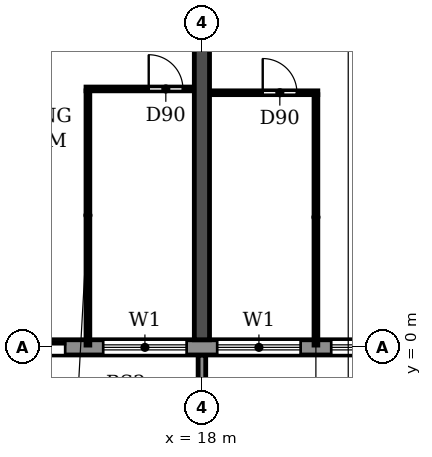
"""IFC4 building model, lengths in metres.
Left out: names, types, materials, properties, quantities, classifications, styles, units other than length and angle.
Written with IfcOpenShell. Run it as: python <this file> out.ifc"""

import sys

from ifc_helpers import new_model, si_unit, direction, frame, frame_2d, origin, place, context, subcontext, project, spatial, polyline, rectangle, outline, extrude, source, transform, mapped, element, fill, save


model = new_model("IFC4")
c1 = context("Model", 3, precision=1e-05, world=origin(), true_north=direction((0.0, 1.0)))
c2 = subcontext(c1, "Body", "Model", "MODEL_VIEW")
j1 = project(units=[si_unit("LENGTHUNIT", "METRE"), si_unit("PLANEANGLEUNIT", "RADIAN")], contexts=[c1])
p1 = place(None, origin())
s1 = spatial("IfcSite", under=j1, at=p1, CompositionType="ELEMENT")
p2 = place(p1, origin())
s2 = spatial("IfcBuilding", under=s1, at=p2, CompositionType="ELEMENT")
p3 = place(p2, frame((0.0, 0.0, 33.3)))
s3 = spatial("IfcBuildingStorey", under=s2, at=p3, CompositionType="ELEMENT", Elevation=33.3)
p4 = place(p3, frame((18.0, 0.2, 0.0), z_axis=(0.0, 0.0, 1.0), x_axis=(0.0, 1.0, 0.0)))
e1 = element("IfcWall", 1, at=p4, inside=s3, PredefinedType="SHEAR", context=c2, shape_type="SweptSolid", body=[
    extrude(rectangle(XDim=11.65, YDim=0.4, at=frame_2d((5.825, 0.0))), origin(), (0.0, 0.0, 1.0), 3.05),
])
p5 = place(p3, frame((4.683, 0.0, 0.0), z_axis=(0.0, 0.0, 1.0), x_axis=(1.0, 0.0, 0.0)))
e2 = element("IfcWall", 2, at=p5, inside=s3, PredefinedType="STANDARD", context=c2, shape_type="SweptSolid", body=[
    extrude(rectangle(XDim=92.634, YDim=0.4, at=frame_2d((46.317, 0.0))), origin(), (0.0, 0.0, 1.0), 3.05),
])
p6 = place(p5, frame((1.717, 0.0, 0.9)))
e3 = element("IfcOpeningElement", 3, at=p6, cuts=e2, PredefinedType="OPENING", context=c2, shape_type="SweptSolid", body=[
    extrude(rectangle(XDim=2.2, YDim=1.5, at=frame_2d((1.1, 0.75))), frame((0.0, 0.21, 0.0), z_axis=(0.0, -1.0, 0.0), x_axis=(1.0, 0.0, 0.0)), (0.0, 0.0, 1.0), 0.42),
])
p7 = place(p5, frame((4.717, 0.0, 0.9)))
e4 = element("IfcOpeningElement", 4, at=p7, cuts=e2, PredefinedType="OPENING", context=c2, shape_type="SweptSolid", body=[
    extrude(rectangle(XDim=2.2, YDim=1.5, at=frame_2d((1.1, 0.75))), frame((0.0, 0.21, 0.0), z_axis=(0.0, -1.0, 0.0), x_axis=(1.0, 0.0, 0.0)), (0.0, 0.0, 1.0), 0.42),
])
p8 = place(p5, frame((7.917, 0.0, 0.0)))
e5 = element("IfcOpeningElement", 5, at=p8, cuts=e2, PredefinedType="OPENING", context=c2, shape_type="SweptSolid", body=[
    extrude(rectangle(XDim=1.8, YDim=2.4, at=frame_2d((0.9, 1.2))), frame((0.0, 0.21, 0.0), z_axis=(0.0, -1.0, 0.0), x_axis=(1.0, 0.0, 0.0)), (0.0, 0.0, 1.0), 0.42),
])
p9 = place(p5, frame((10.717, 0.0, 0.9)))
e6 = element("IfcOpeningElement", 6, at=p9, cuts=e2, PredefinedType="OPENING", context=c2, shape_type="SweptSolid", body=[
    extrude(rectangle(XDim=2.2, YDim=1.5, at=frame_2d((1.1, 0.75))), frame((0.0, 0.21, 0.0), z_axis=(0.0, -1.0, 0.0), x_axis=(1.0, 0.0, 0.0)), (0.0, 0.0, 1.0), 0.42),
])
p10 = place(p5, frame((13.717, 0.0, 0.9)))
e7 = element("IfcOpeningElement", 7, at=p10, cuts=e2, PredefinedType="OPENING", context=c2, shape_type="SweptSolid", body=[
    extrude(rectangle(XDim=2.2, YDim=1.5, at=frame_2d((1.1, 0.75))), frame((0.0, 0.21, 0.0), z_axis=(0.0, -1.0, 0.0), x_axis=(1.0, 0.0, 0.0)), (0.0, 0.0, 1.0), 0.42),
])
p11 = place(p5, frame((16.717, 0.0, 0.9)))
e8 = element("IfcOpeningElement", 8, at=p11, cuts=e2, PredefinedType="OPENING", context=c2, shape_type="SweptSolid", body=[
    extrude(rectangle(XDim=2.2, YDim=1.5, at=frame_2d((1.1, 0.75))), frame((0.0, 0.21, 0.0), z_axis=(0.0, -1.0, 0.0), x_axis=(1.0, 0.0, 0.0)), (0.0, 0.0, 1.0), 0.42),
])
p12 = place(p5, frame((19.717, 0.0, 0.9)))
e9 = element("IfcOpeningElement", 9, at=p12, cuts=e2, PredefinedType="OPENING", context=c2, shape_type="SweptSolid", body=[
    extrude(rectangle(XDim=2.2, YDim=1.5, at=frame_2d((1.1, 0.75))), frame((0.0, 0.21, 0.0), z_axis=(0.0, -1.0, 0.0), x_axis=(1.0, 0.0, 0.0)), (0.0, 0.0, 1.0), 0.42),
])
p13 = place(p5, frame((22.917, 0.0, 0.0)))
e10 = element("IfcOpeningElement", 10, at=p13, cuts=e2, PredefinedType="OPENING", context=c2, shape_type="SweptSolid", body=[
    extrude(rectangle(XDim=1.8, YDim=2.4, at=frame_2d((0.9, 1.2))), frame((0.0, 0.21, 0.0), z_axis=(0.0, -1.0, 0.0), x_axis=(1.0, 0.0, 0.0)), (0.0, 0.0, 1.0), 0.42),
])
p14 = place(p5, frame((25.717, 0.0, 0.9)))
e11 = element("IfcOpeningElement", 11, at=p14, cuts=e2, PredefinedType="OPENING", context=c2, shape_type="SweptSolid", body=[
    extrude(rectangle(XDim=2.2, YDim=1.5, at=frame_2d((1.1, 0.75))), frame((0.0, 0.21, 0.0), z_axis=(0.0, -1.0, 0.0), x_axis=(1.0, 0.0, 0.0)), (0.0, 0.0, 1.0), 0.42),
])
p15 = place(p5, frame((28.717, 0.0, 0.9)))
e12 = element("IfcOpeningElement", 12, at=p15, cuts=e2, PredefinedType="OPENING", context=c2, shape_type="SweptSolid", body=[
    extrude(rectangle(XDim=2.2, YDim=1.5, at=frame_2d((1.1, 0.75))), frame((0.0, 0.21, 0.0), z_axis=(0.0, -1.0, 0.0), x_axis=(1.0, 0.0, 0.0)), (0.0, 0.0, 1.0), 0.42),
])
p16 = place(p5, frame((31.717, 0.0, 0.9)))
e13 = element("IfcOpeningElement", 13, at=p16, cuts=e2, PredefinedType="OPENING", context=c2, shape_type="SweptSolid", body=[
    extrude(rectangle(XDim=2.2, YDim=1.5, at=frame_2d((1.1, 0.75))), frame((0.0, 0.21, 0.0), z_axis=(0.0, -1.0, 0.0), x_axis=(1.0, 0.0, 0.0)), (0.0, 0.0, 1.0), 0.42),
])
p17 = place(p5, frame((34.717, 0.0, 0.9)))
e14 = element("IfcOpeningElement", 14, at=p17, cuts=e2, PredefinedType="OPENING", context=c2, shape_type="SweptSolid", body=[
    extrude(rectangle(XDim=2.2, YDim=1.5, at=frame_2d((1.1, 0.75))), frame((0.0, 0.21, 0.0), z_axis=(0.0, -1.0, 0.0), x_axis=(1.0, 0.0, 0.0)), (0.0, 0.0, 1.0), 0.42),
])
p18 = place(p5, frame((37.717, 0.0, 0.9)))
e15 = element("IfcOpeningElement", 15, at=p18, cuts=e2, PredefinedType="OPENING", context=c2, shape_type="SweptSolid", body=[
    extrude(rectangle(XDim=2.2, YDim=1.5, at=frame_2d((1.1, 0.75))), frame((0.0, 0.21, 0.0), z_axis=(0.0, -1.0, 0.0), x_axis=(1.0, 0.0, 0.0)), (0.0, 0.0, 1.0), 0.42),
])
p19 = place(p5, frame((40.717, 0.0, 0.9)))
e16 = element("IfcOpeningElement", 16, at=p19, cuts=e2, PredefinedType="OPENING", context=c2, shape_type="SweptSolid", body=[
    extrude(rectangle(XDim=2.2, YDim=1.5, at=frame_2d((1.1, 0.75))), frame((0.0, 0.21, 0.0), z_axis=(0.0, -1.0, 0.0), x_axis=(1.0, 0.0, 0.0)), (0.0, 0.0, 1.0), 0.42),
])
p20 = place(p5, frame((43.717, 0.0, 0.9)))
e17 = element("IfcOpeningElement", 17, at=p20, cuts=e2, PredefinedType="OPENING", context=c2, shape_type="SweptSolid", body=[
    extrude(rectangle(XDim=2.2, YDim=1.5, at=frame_2d((1.1, 0.75))), frame((0.0, 0.21, 0.0), z_axis=(0.0, -1.0, 0.0), x_axis=(1.0, 0.0, 0.0)), (0.0, 0.0, 1.0), 0.42),
])
p21 = place(p5, frame((46.917, 0.0, 0.0)))
e18 = element("IfcOpeningElement", 18, at=p21, cuts=e2, PredefinedType="OPENING", context=c2, shape_type="SweptSolid", body=[
    extrude(rectangle(XDim=1.8, YDim=2.4, at=frame_2d((0.9, 1.2))), frame((0.0, 0.21, 0.0), z_axis=(0.0, -1.0, 0.0), x_axis=(1.0, 0.0, 0.0)), (0.0, 0.0, 1.0), 0.42),
])
p22 = place(p5, frame((49.717, 0.0, 0.9)))
e19 = element("IfcOpeningElement", 19, at=p22, cuts=e2, PredefinedType="OPENING", context=c2, shape_type="SweptSolid", body=[
    extrude(rectangle(XDim=2.2, YDim=1.5, at=frame_2d((1.1, 0.75))), frame((0.0, 0.21, 0.0), z_axis=(0.0, -1.0, 0.0), x_axis=(1.0, 0.0, 0.0)), (0.0, 0.0, 1.0), 0.42),
])
p23 = place(p5, frame((52.717, 0.0, 0.9)))
e20 = element("IfcOpeningElement", 20, at=p23, cuts=e2, PredefinedType="OPENING", context=c2, shape_type="SweptSolid", body=[
    extrude(rectangle(XDim=2.2, YDim=1.5, at=frame_2d((1.1, 0.75))), frame((0.0, 0.21, 0.0), z_axis=(0.0, -1.0, 0.0), x_axis=(1.0, 0.0, 0.0)), (0.0, 0.0, 1.0), 0.42),
])
p24 = place(p5, frame((55.717, 0.0, 0.9)))
e21 = element("IfcOpeningElement", 21, at=p24, cuts=e2, PredefinedType="OPENING", context=c2, shape_type="SweptSolid", body=[
    extrude(rectangle(XDim=2.2, YDim=1.5, at=frame_2d((1.1, 0.75))), frame((0.0, 0.21, 0.0), z_axis=(0.0, -1.0, 0.0), x_axis=(1.0, 0.0, 0.0)), (0.0, 0.0, 1.0), 0.42),
])
p25 = place(p5, frame((58.917, 0.0, 0.0)))
e22 = element("IfcOpeningElement", 22, at=p25, cuts=e2, PredefinedType="OPENING", context=c2, shape_type="SweptSolid", body=[
    extrude(rectangle(XDim=1.8, YDim=2.4, at=frame_2d((0.9, 1.2))), frame((0.0, 0.21, 0.0), z_axis=(0.0, -1.0, 0.0), x_axis=(1.0, 0.0, 0.0)), (0.0, 0.0, 1.0), 0.42),
])
p26 = place(p5, frame((61.717, 0.0, 0.9)))
e23 = element("IfcOpeningElement", 23, at=p26, cuts=e2, PredefinedType="OPENING", context=c2, shape_type="SweptSolid", body=[
    extrude(rectangle(XDim=2.2, YDim=1.5, at=frame_2d((1.1, 0.75))), frame((0.0, 0.21, 0.0), z_axis=(0.0, -1.0, 0.0), x_axis=(1.0, 0.0, 0.0)), (0.0, 0.0, 1.0), 0.42),
])
p27 = place(p5, frame((64.717, 0.0, 0.9)))
e24 = element("IfcOpeningElement", 24, at=p27, cuts=e2, PredefinedType="OPENING", context=c2, shape_type="SweptSolid", body=[
    extrude(rectangle(XDim=2.2, YDim=1.5, at=frame_2d((1.1, 0.75))), frame((0.0, 0.21, 0.0), z_axis=(0.0, -1.0, 0.0), x_axis=(1.0, 0.0, 0.0)), (0.0, 0.0, 1.0), 0.42),
])
p28 = place(p5, frame((67.717, 0.0, 0.9)))
e25 = element("IfcOpeningElement", 25, at=p28, cuts=e2, PredefinedType="OPENING", context=c2, shape_type="SweptSolid", body=[
    extrude(rectangle(XDim=2.2, YDim=1.5, at=frame_2d((1.1, 0.75))), frame((0.0, 0.21, 0.0), z_axis=(0.0, -1.0, 0.0), x_axis=(1.0, 0.0, 0.0)), (0.0, 0.0, 1.0), 0.42),
])
p29 = place(p5, frame((70.917, 0.0, 0.0)))
e26 = element("IfcOpeningElement", 26, at=p29, cuts=e2, PredefinedType="OPENING", context=c2, shape_type="SweptSolid", body=[
    extrude(rectangle(XDim=1.8, YDim=2.4, at=frame_2d((0.9, 1.2))), frame((0.0, 0.21, 0.0), z_axis=(0.0, -1.0, 0.0), x_axis=(1.0, 0.0, 0.0)), (0.0, 0.0, 1.0), 0.42),
])
p30 = place(p5, frame((73.717, 0.0, 0.9)))
e27 = element("IfcOpeningElement", 27, at=p30, cuts=e2, PredefinedType="OPENING", context=c2, shape_type="SweptSolid", body=[
    extrude(rectangle(XDim=2.2, YDim=1.5, at=frame_2d((1.1, 0.75))), frame((0.0, 0.21, 0.0), z_axis=(0.0, -1.0, 0.0), x_axis=(1.0, 0.0, 0.0)), (0.0, 0.0, 1.0), 0.42),
])
p31 = place(p5, frame((76.717, 0.0, 0.9)))
e28 = element("IfcOpeningElement", 28, at=p31, cuts=e2, PredefinedType="OPENING", context=c2, shape_type="SweptSolid", body=[
    extrude(rectangle(XDim=2.2, YDim=1.5, at=frame_2d((1.1, 0.75))), frame((0.0, 0.21, 0.0), z_axis=(0.0, -1.0, 0.0), x_axis=(1.0, 0.0, 0.0)), (0.0, 0.0, 1.0), 0.42),
])
p32 = place(p5, frame((79.717, 0.0, 0.9)))
e29 = element("IfcOpeningElement", 29, at=p32, cuts=e2, PredefinedType="OPENING", context=c2, shape_type="SweptSolid", body=[
    extrude(rectangle(XDim=2.2, YDim=1.5, at=frame_2d((1.1, 0.75))), frame((0.0, 0.21, 0.0), z_axis=(0.0, -1.0, 0.0), x_axis=(1.0, 0.0, 0.0)), (0.0, 0.0, 1.0), 0.42),
])
p33 = place(p5, frame((82.717, 0.0, 0.9)))
e30 = element("IfcOpeningElement", 30, at=p33, cuts=e2, PredefinedType="OPENING", context=c2, shape_type="SweptSolid", body=[
    extrude(rectangle(XDim=2.2, YDim=1.5, at=frame_2d((1.1, 0.75))), frame((0.0, 0.21, 0.0), z_axis=(0.0, -1.0, 0.0), x_axis=(1.0, 0.0, 0.0)), (0.0, 0.0, 1.0), 0.42),
])
p34 = place(p5, frame((85.717, 0.0, 0.9)))
e31 = element("IfcOpeningElement", 31, at=p34, cuts=e2, PredefinedType="OPENING", context=c2, shape_type="SweptSolid", body=[
    extrude(rectangle(XDim=2.2, YDim=1.5, at=frame_2d((1.1, 0.75))), frame((0.0, 0.21, 0.0), z_axis=(0.0, -1.0, 0.0), x_axis=(1.0, 0.0, 0.0)), (0.0, 0.0, 1.0), 0.42),
])
p35 = place(p5, frame((88.717, 0.0, 0.9)))
e32 = element("IfcOpeningElement", 32, at=p35, cuts=e2, PredefinedType="OPENING", context=c2, shape_type="SweptSolid", body=[
    extrude(rectangle(XDim=2.2, YDim=1.5, at=frame_2d((1.1, 0.75))), frame((0.0, 0.21, 0.0), z_axis=(0.0, -1.0, 0.0), x_axis=(1.0, 0.0, 0.0)), (0.0, 0.0, 1.0), 0.42),
])
m1 = source(origin(), c2, "Body", "SweptSolid", [
    extrude(outline(polyline([(0.0, 0.0), (0.2, 0.0), (0.2, 1.65), (0.0, 1.65), (0.0, 0.0)])), origin(), (0.0, 0.0, 1.0), 3.1),
])
p36 = place(p3, frame((17.9, -1.85, 0.0)))
e33 = element("IfcWall", 33, at=p36, inside=s3, PredefinedType="STANDARD", context=c2, shape_type="MappedRepresentation", body=[
    mapped(m1, transform((0.0, 0.0, 0.0))),
])
p37 = place(p3, frame((18.21, 6.7, 0.0), z_axis=(0.0, 0.0, 1.0), x_axis=(1.0, 0.0, 0.0)))
e34 = element("IfcWall", 34, at=p37, inside=s3, PredefinedType="PARTITIONING", context=c2, shape_type="SweptSolid", body=[
    extrude(rectangle(XDim=2.84, YDim=0.1, at=frame_2d((1.42, 0.0))), origin(), (0.0, 0.0, 1.0), 3.05),
])
p38 = place(p37, frame((1.39, 0.0, 0.0)))
e35 = element("IfcOpeningElement", 35, at=p38, cuts=e34, PredefinedType="OPENING", context=c2, shape_type="SweptSolid", body=[
    extrude(rectangle(XDim=0.9, YDim=2.1, at=frame_2d((0.45, 1.05))), frame((0.0, 0.06, 0.0), z_axis=(0.0, -1.0, 0.0), x_axis=(1.0, 0.0, 0.0)), (0.0, 0.0, 1.0), 0.12),
])
p39 = place(p3, frame((14.95, 6.8, 0.0), z_axis=(0.0, 0.0, 1.0), x_axis=(1.0, 0.0, 0.0)))
e36 = element("IfcWall", 36, at=p39, inside=s3, PredefinedType="PARTITIONING", context=c2, shape_type="SweptSolid", body=[
    extrude(rectangle(XDim=2.84, YDim=0.1, at=frame_2d((1.42, 0.0))), origin(), (0.0, 0.0, 1.0), 3.05),
])
p40 = place(p39, frame((1.65, 0.0, 0.0)))
e37 = element("IfcOpeningElement", 37, at=p40, cuts=e36, PredefinedType="OPENING", context=c2, shape_type="SweptSolid", body=[
    extrude(rectangle(XDim=0.9, YDim=2.1, at=frame_2d((0.45, 1.05))), frame((0.0, 0.06, 0.0), z_axis=(0.0, -1.0, 0.0), x_axis=(1.0, 0.0, 0.0)), (0.0, 0.0, 1.0), 0.12),
])
p41 = place(p3, frame((15.0, 0.06, 0.0), z_axis=(0.0, 0.0, 1.0), x_axis=(0.0, 1.0, 0.0)))
e38 = element("IfcWall", 38, at=p41, inside=s3, PredefinedType="PARTITIONING", context=c2, shape_type="SweptSolid", body=[
    extrude(rectangle(XDim=6.69, YDim=0.1, at=frame_2d((3.345, 0.0))), origin(), (0.0, 0.0, 1.0), 3.05),
])
p42 = place(p3, frame((21.0, 0.06, 0.0), z_axis=(0.0, 0.0, 1.0), x_axis=(0.0, 1.0, 0.0)))
e39 = element("IfcWall", 39, at=p42, inside=s3, PredefinedType="PARTITIONING", context=c2, shape_type="SweptSolid", body=[
    extrude(rectangle(XDim=6.59, YDim=0.1, at=frame_2d((3.295, 0.0))), origin(), (0.0, 0.0, 1.0), 3.05),
])
p43 = place(p8, origin())
e40 = element("IfcDoor", 40, at=p43, inside=s3, OperationType="DOUBLE_DOOR_SLIDING", PredefinedType="DOOR", context=c2, shape_type="SweptSolid", body=[
    extrude(rectangle(XDim=1.8, YDim=2.4, at=frame_2d((0.9, 1.2))), frame((0.0, 0.025, 0.0), z_axis=(0.0, -1.0, 0.0), x_axis=(1.0, 0.0, 0.0)), (0.0, 0.0, 1.0), 0.05),
])
fill(e5, e40)
p44 = place(p9, origin())
e41 = element("IfcWindow", 41, at=p44, inside=s3, PartitioningType="DOUBLE_PANEL_HORIZONTAL", PredefinedType="WINDOW", context=c2, shape_type="SweptSolid", body=[
    extrude(rectangle(XDim=2.2, YDim=1.5, at=frame_2d((1.1, 0.75))), frame((0.0, 0.03, 0.0), z_axis=(0.0, -1.0, 0.0), x_axis=(1.0, 0.0, 0.0)), (0.0, 0.0, 1.0), 0.06),
])
fill(e6, e41)
p45 = place(p10, origin())
e42 = element("IfcWindow", 42, at=p45, inside=s3, PartitioningType="DOUBLE_PANEL_HORIZONTAL", PredefinedType="WINDOW", context=c2, shape_type="SweptSolid", body=[
    extrude(rectangle(XDim=2.2, YDim=1.5, at=frame_2d((1.1, 0.75))), frame((0.0, 0.03, 0.0), z_axis=(0.0, -1.0, 0.0), x_axis=(1.0, 0.0, 0.0)), (0.0, 0.0, 1.0), 0.06),
])
fill(e7, e42)
p46 = place(p11, origin())
e43 = element("IfcWindow", 43, at=p46, inside=s3, PartitioningType="DOUBLE_PANEL_HORIZONTAL", PredefinedType="WINDOW", context=c2, shape_type="SweptSolid", body=[
    extrude(rectangle(XDim=2.2, YDim=1.5, at=frame_2d((1.1, 0.75))), frame((0.0, 0.03, 0.0), z_axis=(0.0, -1.0, 0.0), x_axis=(1.0, 0.0, 0.0)), (0.0, 0.0, 1.0), 0.06),
])
fill(e8, e43)
p47 = place(p40, origin())
e44 = element("IfcDoor", 44, at=p47, inside=s3, OperationType="SINGLE_SWING_LEFT", PredefinedType="DOOR", context=c2, shape_type="SweptSolid", body=[
    extrude(rectangle(XDim=0.9, YDim=2.1, at=frame_2d((0.45, 1.05))), frame((0.0, 0.025, 0.0), z_axis=(0.0, -1.0, 0.0), x_axis=(1.0, 0.0, 0.0)), (0.0, 0.0, 1.0), 0.05),
])
fill(e37, e44)
p48 = place(p38, origin())
e45 = element("IfcDoor", 45, at=p48, inside=s3, OperationType="SINGLE_SWING_LEFT", PredefinedType="DOOR", context=c2, shape_type="SweptSolid", body=[
    extrude(rectangle(XDim=0.9, YDim=2.1, at=frame_2d((0.45, 1.05))), frame((0.0, 0.025, 0.0), z_axis=(0.0, -1.0, 0.0), x_axis=(1.0, 0.0, 0.0)), (0.0, 0.0, 1.0), 0.05),
])
fill(e35, e45)
save(model, sys.argv[1])
